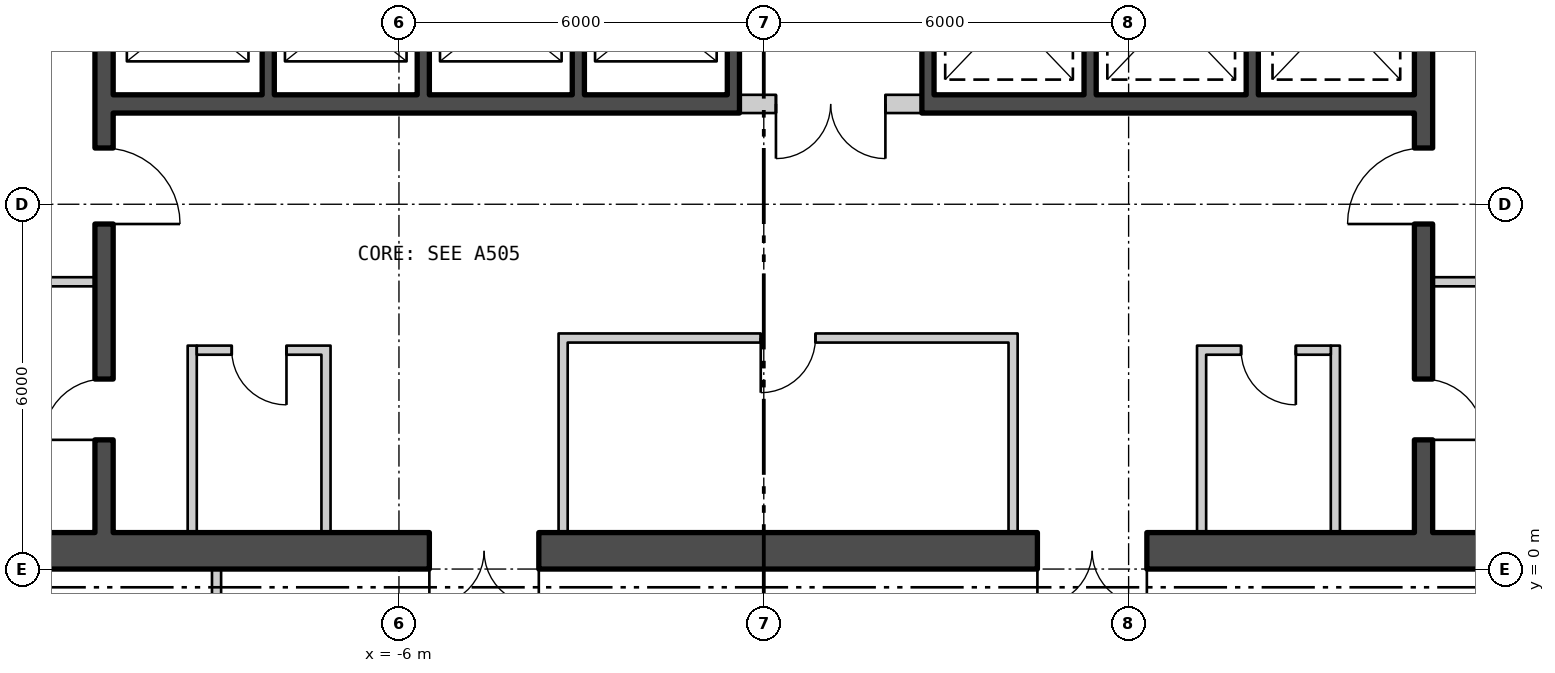
"""IFC4 building model, lengths in metres.
Left out: names, types, materials, properties, quantities, classifications, styles, units other than length and angle.
Written with IfcOpenShell. Run it as: python <this file> out.ifc"""

import sys

from ifc_helpers import new_model, si_unit, direction, frame, frame_2d, origin, place, context, subcontext, project, spatial, rectangle, extrude, element, fill, save


model = new_model("IFC4")
c1 = context("Model", 3, precision=1e-05, world=origin(), true_north=direction((0.0, 1.0)))
c2 = subcontext(c1, "Body", "Model", "MODEL_VIEW")
j1 = project(units=[si_unit("LENGTHUNIT", "METRE"), si_unit("PLANEANGLEUNIT", "RADIAN")], contexts=[c1])
p1 = place(None, origin())
s1 = spatial("IfcSite", under=j1, at=p1, CompositionType="ELEMENT")
p2 = place(p1, origin())
s2 = spatial("IfcBuilding", under=s1, at=p2, CompositionType="ELEMENT")
p3 = place(p2, frame((0.0, 0.0, 8.4)))
s3 = spatial("IfcBuildingStorey", under=s2, at=p3, CompositionType="ELEMENT", Elevation=8.4)
p4 = place(p3, frame((-17.5, 0.3, 0.0), z_axis=(0.0, 0.0, 1.0), x_axis=(1.0, 0.0, 0.0)))
e1 = element("IfcWall", 1, at=p4, inside=s3, PredefinedType="SHEAR", context=c2, shape_type="SweptSolid", body=[
    extrude(rectangle(XDim=35.0, YDim=0.6, at=frame_2d((17.5, 0.0))), origin(), (0.0, 0.0, 1.0), 4.88),
])
p5 = place(p4, frame((12.0, 0.0, 0.0)))
e2 = element("IfcOpeningElement", 2, at=p5, cuts=e1, PredefinedType="OPENING", context=c2, shape_type="SweptSolid", body=[
    extrude(rectangle(XDim=1.8, YDim=2.4, at=frame_2d((0.9, 1.2))), frame((0.0, 0.31, 0.0), z_axis=(0.0, -1.0, 0.0), x_axis=(1.0, 0.0, 0.0)), (0.0, 0.0, 1.0), 0.62),
])
p6 = place(p4, frame((22.0, 0.0, 0.0)))
e3 = element("IfcOpeningElement", 3, at=p6, cuts=e1, PredefinedType="OPENING", context=c2, shape_type="SweptSolid", body=[
    extrude(rectangle(XDim=1.8, YDim=2.4, at=frame_2d((0.9, 1.2))), frame((0.0, 0.31, 0.0), z_axis=(0.0, -1.0, 0.0), x_axis=(1.0, 0.0, 0.0)), (0.0, 0.0, 1.0), 0.62),
])
p7 = place(p3, frame((-10.85, 0.6, 0.0), z_axis=(0.0, 0.0, 1.0), x_axis=(0.0, 1.0, 0.0)))
e4 = element("IfcWall", 4, at=p7, inside=s3, PredefinedType="SHEAR", context=c2, shape_type="SweptSolid", body=[
    extrude(rectangle(XDim=16.8, YDim=0.3, at=frame_2d((8.4, 0.0))), origin(), (0.0, 0.0, 1.0), 4.88),
])
p8 = place(p7, frame((5.075, 0.0, 0.0)))
e5 = element("IfcOpeningElement", 5, at=p8, cuts=e4, PredefinedType="OPENING", context=c2, shape_type="SweptSolid", body=[
    extrude(rectangle(XDim=1.25, YDim=2.1, at=frame_2d((0.625, 1.05))), frame((0.0, 0.16, 0.0), z_axis=(0.0, -1.0, 0.0), x_axis=(1.0, 0.0, 0.0)), (0.0, 0.0, 1.0), 0.32),
])
p9 = place(p7, frame((1.525, 0.0, 0.0)))
e6 = element("IfcOpeningElement", 6, at=p9, cuts=e4, PredefinedType="OPENING", context=c2, shape_type="SweptSolid", body=[
    extrude(rectangle(XDim=1.0, YDim=2.1, at=frame_2d((0.5, 1.05))), frame((0.0, 0.16, 0.0), z_axis=(0.0, -1.0, 0.0), x_axis=(1.0, 0.0, 0.0)), (0.0, 0.0, 1.0), 0.32),
])
p10 = place(p3, frame((10.85, 0.6, 0.0), z_axis=(0.0, 0.0, 1.0), x_axis=(0.0, 1.0, 0.0)))
e7 = element("IfcWall", 7, at=p10, inside=s3, PredefinedType="SHEAR", context=c2, shape_type="SweptSolid", body=[
    extrude(rectangle(XDim=16.8, YDim=0.3, at=frame_2d((8.4, 0.0))), origin(), (0.0, 0.0, 1.0), 4.88),
])
p11 = place(p10, frame((5.075, 0.0, 0.0)))
e8 = element("IfcOpeningElement", 8, at=p11, cuts=e7, PredefinedType="OPENING", context=c2, shape_type="SweptSolid", body=[
    extrude(rectangle(XDim=1.25, YDim=2.1, at=frame_2d((0.625, 1.05))), frame((0.0, 0.16, 0.0), z_axis=(0.0, -1.0, 0.0), x_axis=(1.0, 0.0, 0.0)), (0.0, 0.0, 1.0), 0.32),
])
p12 = place(p10, frame((1.525, 0.0, 0.0)))
e9 = element("IfcOpeningElement", 9, at=p12, cuts=e7, PredefinedType="OPENING", context=c2, shape_type="SweptSolid", body=[
    extrude(rectangle(XDim=1.0, YDim=2.1, at=frame_2d((0.5, 1.05))), frame((0.0, 0.16, 0.0), z_axis=(0.0, -1.0, 0.0), x_axis=(1.0, 0.0, 0.0)), (0.0, 0.0, 1.0), 0.32),
])
p13 = place(p3, frame((-10.7, 7.65, 0.0), z_axis=(0.0, 0.0, 1.0), x_axis=(1.0, 0.0, 0.0)))
e10 = element("IfcWall", 10, at=p13, inside=s3, PredefinedType="SHEAR", context=c2, shape_type="SweptSolid", body=[
    extrude(rectangle(XDim=10.3, YDim=0.3, at=frame_2d((5.15, 0.0))), origin(), (0.0, 0.0, 1.0), 4.88),
])
p14 = place(p3, frame((2.6, 7.65, 0.0), z_axis=(0.0, 0.0, 1.0), x_axis=(1.0, 0.0, 0.0)))
e11 = element("IfcWall", 11, at=p14, inside=s3, PredefinedType="SHEAR", context=c2, shape_type="SweptSolid", body=[
    extrude(rectangle(XDim=8.1, YDim=0.3, at=frame_2d((4.05, 0.0))), origin(), (0.0, 0.0, 1.0), 4.88),
])
for number, where, z_axis, x_axis in (
    (12, (-8.15, 7.8, 0.0), (0.0, 0.0, 1.0), (0.0, 1.0, 0.0)),
    (13, (-5.6, 7.8, 0.0), (0.0, 0.0, 1.0), (0.0, 1.0, 0.0)),
    (14, (-3.05, 7.8, 0.0), (0.0, 0.0, 1.0), (0.0, 1.0, 0.0)),
    (15, (-0.5, 7.8, 0.0), (0.0, 0.0, 1.0), (0.0, 1.0, 0.0)),
    (16, (2.7, 7.8, 0.0), (0.0, 0.0, 1.0), (0.0, 1.0, 0.0)),
    (17, (5.367, 7.8, 0.0), (0.0, 0.0, 1.0), (0.0, 1.0, 0.0)),
    (18, (8.033, 7.8, 0.0), (0.0, 0.0, 1.0), (0.0, 1.0, 0.0)),
):
    element("IfcWall", number, at=place(p3, frame(where, z_axis=z_axis, x_axis=x_axis)), inside=s3, PredefinedType="SHEAR", context=c2, shape_type="SweptSolid", body=[
        extrude(rectangle(XDim=2.7, YDim=0.2, at=frame_2d((1.35, 0.0))), origin(), (0.0, 0.0, 1.0), 4.88),
    ])
for number, where, z_axis, x_axis in (
    (19, (-14.2, 4.725, 0.0), (0.0, 0.0, 1.0), (1.0, 0.0, 0.0)),
    (20, (11.0, 4.725, 0.0), (0.0, 0.0, 1.0), (1.0, 0.0, 0.0)),
):
    element("IfcWall", number, at=place(p3, frame(where, z_axis=z_axis, x_axis=x_axis)), inside=s3, PredefinedType="PARTITIONING", context=c2, shape_type="SweptSolid", body=[
        extrude(rectangle(XDim=3.2, YDim=0.15, at=frame_2d((1.6, 0.0))), origin(), (0.0, 0.0, 1.0), 4.88),
    ])
for number, where, z_axis, x_axis in (
    (21, (7.2, 0.6, 0.0), (0.0, 0.0, 1.0), (0.0, 1.0, 0.0)),
    (22, (9.4, 0.6, 0.0), (0.0, 0.0, 1.0), (0.0, 1.0, 0.0)),
):
    element("IfcWall", number, at=place(p3, frame(where, z_axis=z_axis, x_axis=x_axis)), inside=s3, PredefinedType="PARTITIONING", context=c2, shape_type="SweptSolid", body=[
        extrude(rectangle(XDim=3.075, YDim=0.15, at=frame_2d((1.538, 0.0))), origin(), (0.0, 0.0, 1.0), 4.88),
    ])
p15 = place(p3, frame((7.275, 3.6, 0.0), z_axis=(0.0, 0.0, 1.0), x_axis=(1.0, 0.0, 0.0)))
e23 = element("IfcWall", 23, at=p15, inside=s3, PredefinedType="PARTITIONING", context=c2, shape_type="SweptSolid", body=[
    extrude(rectangle(XDim=2.05, YDim=0.15, at=frame_2d((1.025, 0.0))), origin(), (0.0, 0.0, 1.0), 4.88),
])
p16 = place(p15, frame((0.575, 0.0, 0.0)))
e24 = element("IfcOpeningElement", 24, at=p16, cuts=e23, PredefinedType="OPENING", context=c2, shape_type="SweptSolid", body=[
    extrude(rectangle(XDim=0.9, YDim=2.1, at=frame_2d((0.45, 1.05))), frame((0.0, 0.085, 0.0), z_axis=(0.0, -1.0, 0.0), x_axis=(1.0, 0.0, 0.0)), (0.0, 0.0, 1.0), 0.17),
])
for number, where, z_axis, x_axis in (
    (25, (-3.3, 0.6, 0.0), (0.0, 0.0, 1.0), (0.0, 1.0, 0.0)),
    (26, (4.1, 0.6, 0.0), (0.0, 0.0, 1.0), (0.0, 1.0, 0.0)),
):
    element("IfcWall", number, at=place(p3, frame(where, z_axis=z_axis, x_axis=x_axis)), inside=s3, PredefinedType="PARTITIONING", context=c2, shape_type="SweptSolid", body=[
        extrude(rectangle(XDim=3.275, YDim=0.15, at=frame_2d((1.637, 0.0))), origin(), (0.0, 0.0, 1.0), 4.88),
    ])
p17 = place(p3, frame((-3.225, 3.8, 0.0), z_axis=(0.0, 0.0, 1.0), x_axis=(1.0, 0.0, 0.0)))
e27 = element("IfcWall", 27, at=p17, inside=s3, PredefinedType="PARTITIONING", context=c2, shape_type="SweptSolid", body=[
    extrude(rectangle(XDim=7.25, YDim=0.15, at=frame_2d((3.625, 0.0))), origin(), (0.0, 0.0, 1.0), 4.88),
])
p18 = place(p17, frame((3.175, 0.0, 0.0)))
e28 = element("IfcOpeningElement", 28, at=p18, cuts=e27, PredefinedType="OPENING", context=c2, shape_type="SweptSolid", body=[
    extrude(rectangle(XDim=0.9, YDim=2.1, at=frame_2d((0.45, 1.05))), frame((0.0, 0.085, 0.0), z_axis=(0.0, -1.0, 0.0), x_axis=(1.0, 0.0, 0.0)), (0.0, 0.0, 1.0), 0.17),
])
for number, where, z_axis, x_axis in (
    (29, (-9.4, 0.6, 0.0), (0.0, 0.0, 1.0), (0.0, 1.0, 0.0)),
    (30, (-7.2, 0.6, 0.0), (0.0, 0.0, 1.0), (0.0, 1.0, 0.0)),
):
    element("IfcWall", number, at=place(p3, frame(where, z_axis=z_axis, x_axis=x_axis)), inside=s3, PredefinedType="PARTITIONING", context=c2, shape_type="SweptSolid", body=[
        extrude(rectangle(XDim=3.075, YDim=0.15, at=frame_2d((1.538, 0.0))), origin(), (0.0, 0.0, 1.0), 4.88),
    ])
p19 = place(p3, frame((-9.325, 3.6, 0.0), z_axis=(0.0, 0.0, 1.0), x_axis=(1.0, 0.0, 0.0)))
e31 = element("IfcWall", 31, at=p19, inside=s3, PredefinedType="PARTITIONING", context=c2, shape_type="SweptSolid", body=[
    extrude(rectangle(XDim=2.05, YDim=0.15, at=frame_2d((1.025, 0.0))), origin(), (0.0, 0.0, 1.0), 4.88),
])
p20 = place(p19, frame((0.575, 0.0, 0.0)))
e32 = element("IfcOpeningElement", 32, at=p20, cuts=e31, PredefinedType="OPENING", context=c2, shape_type="SweptSolid", body=[
    extrude(rectangle(XDim=0.9, YDim=2.1, at=frame_2d((0.45, 1.05))), frame((0.0, 0.085, 0.0), z_axis=(0.0, -1.0, 0.0), x_axis=(1.0, 0.0, 0.0)), (0.0, 0.0, 1.0), 0.17),
])
p21 = place(p3, frame((-0.4, 7.65, 0.0), z_axis=(0.0, 0.0, 1.0), x_axis=(1.0, 0.0, 0.0)))
e33 = element("IfcWall", 33, at=p21, inside=s3, PredefinedType="PARTITIONING", context=c2, shape_type="SweptSolid", body=[
    extrude(rectangle(XDim=3.0, YDim=0.3, at=frame_2d((1.5, 0.0))), origin(), (0.0, 0.0, 1.0), 4.88),
])
p22 = place(p21, frame((0.6, 0.0, 0.0)))
e34 = element("IfcOpeningElement", 34, at=p22, cuts=e33, PredefinedType="OPENING", context=c2, shape_type="SweptSolid", body=[
    extrude(rectangle(XDim=1.8, YDim=2.4, at=frame_2d((0.9, 1.2))), frame((0.0, 0.16, 0.0), z_axis=(0.0, -1.0, 0.0), x_axis=(1.0, 0.0, 0.0)), (0.0, 0.0, 1.0), 0.32),
])
p23 = place(p3, frame((-9.0, -13.675, 0.0), z_axis=(0.0, 0.0, 1.0), x_axis=(0.0, 1.0, 0.0)))
e35 = element("IfcWall", 35, at=p23, inside=s3, PredefinedType="PARTITIONING", context=c2, shape_type="SweptSolid", body=[
    extrude(rectangle(XDim=13.675, YDim=0.15, at=frame_2d((6.838, 0.0))), origin(), (0.0, 0.0, 1.0), 4.88),
])
p24 = place(p23, frame((11.969, 0.0, 0.0)))
e36 = element("IfcOpeningElement", 36, at=p24, cuts=e35, PredefinedType="OPENING", context=c2, shape_type="SweptSolid", body=[
    extrude(rectangle(XDim=1.0, YDim=2.1, at=frame_2d((0.5, 1.05))), frame((0.0, 0.085, 0.0), z_axis=(0.0, -1.0, 0.0), x_axis=(1.0, 0.0, 0.0)), (0.0, 0.0, 1.0), 0.17),
])
p25 = place(p8, origin())
e37 = element("IfcDoor", 37, at=p25, inside=s3, OperationType="SINGLE_SWING_LEFT", PredefinedType="DOOR", context=c2, shape_type="SweptSolid", body=[
    extrude(rectangle(XDim=1.25, YDim=2.1, at=frame_2d((0.625, 1.05))), frame((0.0, 0.025, 0.0), z_axis=(0.0, -1.0, 0.0), x_axis=(1.0, 0.0, 0.0)), (0.0, 0.0, 1.0), 0.05),
])
fill(e5, e37)
p26 = place(p9, origin())
e38 = element("IfcDoor", 38, at=p26, inside=s3, OperationType="SINGLE_SWING_RIGHT", PredefinedType="DOOR", context=c2, shape_type="SweptSolid", body=[
    extrude(rectangle(XDim=1.0, YDim=2.1, at=frame_2d((0.5, 1.05))), frame((0.0, 0.025, 0.0), z_axis=(0.0, -1.0, 0.0), x_axis=(1.0, 0.0, 0.0)), (0.0, 0.0, 1.0), 0.05),
])
fill(e6, e38)
p27 = place(p11, origin())
e39 = element("IfcDoor", 39, at=p27, inside=s3, OperationType="SINGLE_SWING_RIGHT", PredefinedType="DOOR", context=c2, shape_type="SweptSolid", body=[
    extrude(rectangle(XDim=1.25, YDim=2.1, at=frame_2d((0.625, 1.05))), frame((0.0, 0.025, 0.0), z_axis=(0.0, -1.0, 0.0), x_axis=(1.0, 0.0, 0.0)), (0.0, 0.0, 1.0), 0.05),
])
fill(e8, e39)
p28 = place(p12, origin())
e40 = element("IfcDoor", 40, at=p28, inside=s3, OperationType="SINGLE_SWING_LEFT", PredefinedType="DOOR", context=c2, shape_type="SweptSolid", body=[
    extrude(rectangle(XDim=1.0, YDim=2.1, at=frame_2d((0.5, 1.05))), frame((0.0, 0.025, 0.0), z_axis=(0.0, -1.0, 0.0), x_axis=(1.0, 0.0, 0.0)), (0.0, 0.0, 1.0), 0.05),
])
fill(e9, e40)
p29 = place(p16, origin())
e41 = element("IfcDoor", 41, at=p29, inside=s3, OperationType="SINGLE_SWING_RIGHT", PredefinedType="DOOR", context=c2, shape_type="SweptSolid", body=[
    extrude(rectangle(XDim=0.9, YDim=2.1, at=frame_2d((0.45, 1.05))), frame((0.0, 0.025, 0.0), z_axis=(0.0, -1.0, 0.0), x_axis=(1.0, 0.0, 0.0)), (0.0, 0.0, 1.0), 0.05),
])
fill(e24, e41)
p30 = place(p18, origin())
e42 = element("IfcDoor", 42, at=p30, inside=s3, OperationType="SINGLE_SWING_LEFT", PredefinedType="DOOR", context=c2, shape_type="SweptSolid", body=[
    extrude(rectangle(XDim=0.9, YDim=2.1, at=frame_2d((0.45, 1.05))), frame((0.0, 0.025, 0.0), z_axis=(0.0, -1.0, 0.0), x_axis=(1.0, 0.0, 0.0)), (0.0, 0.0, 1.0), 0.05),
])
fill(e28, e42)
p31 = place(p20, origin())
e43 = element("IfcDoor", 43, at=p31, inside=s3, OperationType="SINGLE_SWING_RIGHT", PredefinedType="DOOR", context=c2, shape_type="SweptSolid", body=[
    extrude(rectangle(XDim=0.9, YDim=2.1, at=frame_2d((0.45, 1.05))), frame((0.0, 0.025, 0.0), z_axis=(0.0, -1.0, 0.0), x_axis=(1.0, 0.0, 0.0)), (0.0, 0.0, 1.0), 0.05),
])
fill(e32, e43)
p32 = place(p22, origin())
e44 = element("IfcDoor", 44, at=p32, inside=s3, OperationType="DOUBLE_DOOR_SINGLE_SWING", PredefinedType="DOOR", context=c2, shape_type="SweptSolid", body=[
    extrude(rectangle(XDim=1.8, YDim=2.4, at=frame_2d((0.9, 1.2))), frame((0.0, 0.025, 0.0), z_axis=(0.0, -1.0, 0.0), x_axis=(1.0, 0.0, 0.0)), (0.0, 0.0, 1.0), 0.05),
])
fill(e34, e44)
p33 = place(p5, origin())
e45 = element("IfcDoor", 45, at=p33, inside=s3, OperationType="DOUBLE_DOOR_SINGLE_SWING", PredefinedType="DOOR", context=c2, shape_type="SweptSolid", body=[
    extrude(rectangle(XDim=1.8, YDim=2.4, at=frame_2d((0.9, 1.2))), frame((0.0, 0.025, 0.0), z_axis=(0.0, -1.0, 0.0), x_axis=(1.0, 0.0, 0.0)), (0.0, 0.0, 1.0), 0.05),
])
fill(e2, e45)
p34 = place(p6, origin())
e46 = element("IfcDoor", 46, at=p34, inside=s3, OperationType="DOUBLE_DOOR_SINGLE_SWING", PredefinedType="DOOR", context=c2, shape_type="SweptSolid", body=[
    extrude(rectangle(XDim=1.8, YDim=2.4, at=frame_2d((0.9, 1.2))), frame((0.0, 0.025, 0.0), z_axis=(0.0, -1.0, 0.0), x_axis=(1.0, 0.0, 0.0)), (0.0, 0.0, 1.0), 0.05),
])
fill(e3, e46)
save(model, sys.argv[1])
